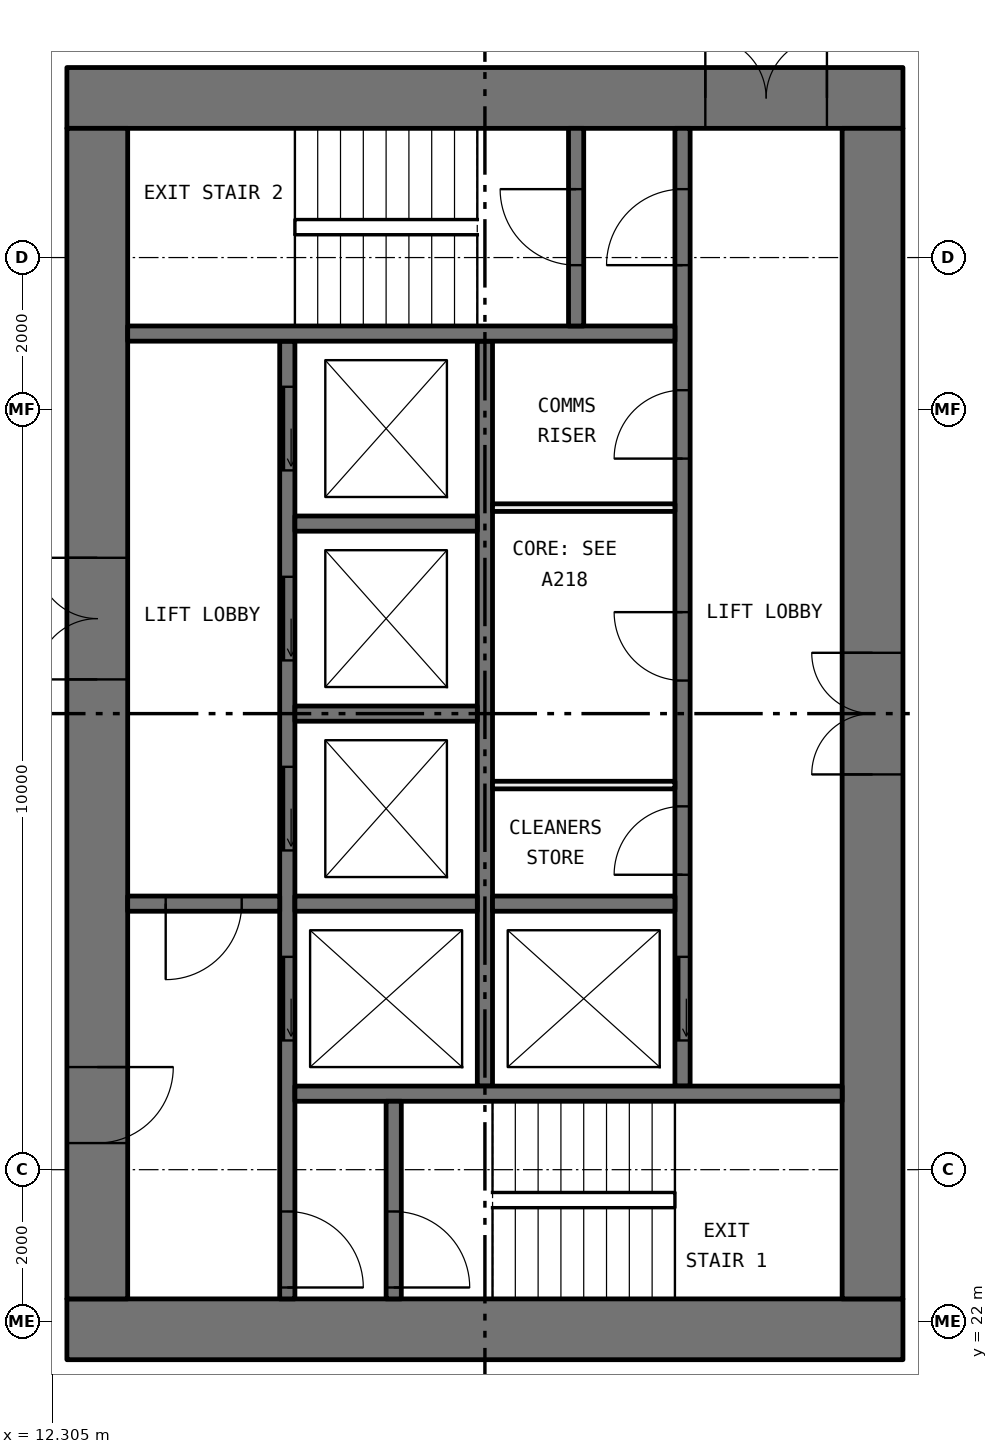
"""IFC4 building model, lengths in metres.
Left out: names, types, materials, properties, quantities, classifications, styles, units other than length and angle.
Written with IfcOpenShell. Run it as: python <this file> out.ifc"""

import sys

from ifc_helpers import new_model, si_unit, direction, frame, frame_2d, origin, place, context, subcontext, project, spatial, rectangle, extrude, element, fill, save


model = new_model("IFC4")
c1 = context("Model", 3, precision=1e-05, world=origin(), true_north=direction((0.0, 1.0)))
c2 = subcontext(c1, "Body", "Model", "MODEL_VIEW")
j1 = project(units=[si_unit("LENGTHUNIT", "METRE"), si_unit("PLANEANGLEUNIT", "RADIAN")], contexts=[c1])
p1 = place(None, origin())
s1 = spatial("IfcSite", under=j1, at=p1, CompositionType="ELEMENT")
p2 = place(p1, origin())
s2 = spatial("IfcBuilding", under=s1, at=p2, CompositionType="ELEMENT")
p3 = place(p2, frame((0.0, 0.0, 71.4)))
s3 = spatial("IfcBuildingStorey", under=s2, at=p3, CompositionType="ELEMENT", Elevation=71.4)
p4 = place(p3, frame((12.5, 21.9, 0.0), z_axis=(0.0, 0.0, 1.0), x_axis=(1.0, 0.0, 0.0)))
e1 = element("IfcWall", 1, at=p4, inside=s3, PredefinedType="SHEAR", context=c2, shape_type="SweptSolid", body=[
    extrude(rectangle(XDim=11.0, YDim=0.8, at=frame_2d((5.5, 0.0))), origin(), (0.0, 0.0, 1.0), 3.05),
])
p5 = place(p3, frame((12.5, 38.1, 0.0), z_axis=(0.0, 0.0, 1.0), x_axis=(1.0, 0.0, 0.0)))
e2 = element("IfcWall", 2, at=p5, inside=s3, PredefinedType="SHEAR", context=c2, shape_type="SweptSolid", body=[
    extrude(rectangle(XDim=11.0, YDim=0.8, at=frame_2d((5.5, 0.0))), origin(), (0.0, 0.0, 1.0), 3.05),
])
p6 = place(p5, frame((8.4, 0.0, 0.0)))
e3 = element("IfcOpeningElement", 3, at=p6, cuts=e2, PredefinedType="OPENING", context=c2, shape_type="SweptSolid", body=[
    extrude(rectangle(XDim=1.6, YDim=2.1, at=frame_2d((0.8, 1.05))), frame((0.0, 0.41, 0.0), z_axis=(0.0, -1.0, 0.0), x_axis=(1.0, 0.0, 0.0)), (0.0, 0.0, 1.0), 0.82),
])
p7 = place(p3, frame((12.9, 22.3, 0.0), z_axis=(0.0, 0.0, 1.0), x_axis=(0.0, 1.0, 0.0)))
e4 = element("IfcWall", 4, at=p7, inside=s3, PredefinedType="SHEAR", context=c2, shape_type="SweptSolid", body=[
    extrude(rectangle(XDim=15.4, YDim=0.8, at=frame_2d((7.7, 0.0))), origin(), (0.0, 0.0, 1.0), 3.05),
])
p8 = place(p7, frame((8.15, 0.0, 0.0)))
e5 = element("IfcOpeningElement", 5, at=p8, cuts=e4, PredefinedType="OPENING", context=c2, shape_type="SweptSolid", body=[
    extrude(rectangle(XDim=1.6, YDim=2.1, at=frame_2d((0.8, 1.05))), frame((0.0, 0.41, 0.0), z_axis=(0.0, -1.0, 0.0), x_axis=(1.0, 0.0, 0.0)), (0.0, 0.0, 1.0), 0.82),
])
p9 = place(p7, frame((2.05, 0.0, 0.0)))
e6 = element("IfcOpeningElement", 6, at=p9, cuts=e4, PredefinedType="OPENING", context=c2, shape_type="SweptSolid", body=[
    extrude(rectangle(XDim=1.0, YDim=2.1, at=frame_2d((0.5, 1.05))), frame((0.0, 0.41, 0.0), z_axis=(0.0, -1.0, 0.0), x_axis=(1.0, 0.0, 0.0)), (0.0, 0.0, 1.0), 0.82),
])
p10 = place(p3, frame((23.1, 22.3, 0.0), z_axis=(0.0, 0.0, 1.0), x_axis=(0.0, 1.0, 0.0)))
e7 = element("IfcWall", 7, at=p10, inside=s3, PredefinedType="SHEAR", context=c2, shape_type="SweptSolid", body=[
    extrude(rectangle(XDim=15.4, YDim=0.8, at=frame_2d((7.7, 0.0))), origin(), (0.0, 0.0, 1.0), 3.05),
])
p11 = place(p10, frame((6.9, 0.0, 0.0)))
e8 = element("IfcOpeningElement", 8, at=p11, cuts=e7, PredefinedType="OPENING", context=c2, shape_type="SweptSolid", body=[
    extrude(rectangle(XDim=1.6, YDim=2.1, at=frame_2d((0.8, 1.05))), frame((0.0, 0.41, 0.0), z_axis=(0.0, -1.0, 0.0), x_axis=(1.0, 0.0, 0.0)), (0.0, 0.0, 1.0), 0.82),
])
p12 = place(p3, frame((15.4, 22.3, 0.0), z_axis=(0.0, 0.0, 1.0), x_axis=(0.0, 1.0, 0.0)))
e9 = element("IfcWall", 9, at=p12, inside=s3, PredefinedType="SOLIDWALL", context=c2, shape_type="SweptSolid", body=[
    extrude(rectangle(XDim=12.6, YDim=0.2, at=frame_2d((6.3, 0.0))), origin(), (0.0, 0.0, 1.0), 3.05),
])
p13 = place(p12, frame((3.4, 0.0, 0.0)))
e10 = element("IfcOpeningElement", 10, at=p13, cuts=e9, PredefinedType="OPENING", context=c2, shape_type="SweptSolid", body=[
    extrude(rectangle(XDim=1.1, YDim=2.1, at=frame_2d((0.55, 1.05))), frame((0.0, 0.11, 0.0), z_axis=(0.0, -1.0, 0.0), x_axis=(1.0, 0.0, 0.0)), (0.0, 0.0, 1.0), 0.22),
])
p14 = place(p12, frame((5.9, 0.0, 0.0)))
e11 = element("IfcOpeningElement", 11, at=p14, cuts=e9, PredefinedType="OPENING", context=c2, shape_type="SweptSolid", body=[
    extrude(rectangle(XDim=1.1, YDim=2.1, at=frame_2d((0.55, 1.05))), frame((0.0, 0.11, 0.0), z_axis=(0.0, -1.0, 0.0), x_axis=(1.0, 0.0, 0.0)), (0.0, 0.0, 1.0), 0.22),
])
p15 = place(p12, frame((8.4, 0.0, 0.0)))
e12 = element("IfcOpeningElement", 12, at=p15, cuts=e9, PredefinedType="OPENING", context=c2, shape_type="SweptSolid", body=[
    extrude(rectangle(XDim=1.1, YDim=2.1, at=frame_2d((0.55, 1.05))), frame((0.0, 0.11, 0.0), z_axis=(0.0, -1.0, 0.0), x_axis=(1.0, 0.0, 0.0)), (0.0, 0.0, 1.0), 0.22),
])
p16 = place(p12, frame((10.9, 0.0, 0.0)))
e13 = element("IfcOpeningElement", 13, at=p16, cuts=e9, PredefinedType="OPENING", context=c2, shape_type="SweptSolid", body=[
    extrude(rectangle(XDim=1.1, YDim=2.1, at=frame_2d((0.55, 1.05))), frame((0.0, 0.11, 0.0), z_axis=(0.0, -1.0, 0.0), x_axis=(1.0, 0.0, 0.0)), (0.0, 0.0, 1.0), 0.22),
])
p17 = place(p12, frame((0.15, 0.0, 0.0)))
e14 = element("IfcOpeningElement", 14, at=p17, cuts=e9, PredefinedType="OPENING", context=c2, shape_type="SweptSolid", body=[
    extrude(rectangle(XDim=1.0, YDim=2.1, at=frame_2d((0.5, 1.05))), frame((0.0, 0.11, 0.0), z_axis=(0.0, -1.0, 0.0), x_axis=(1.0, 0.0, 0.0)), (0.0, 0.0, 1.0), 0.22),
])
p18 = place(p3, frame((20.6, 25.1, 0.0), z_axis=(0.0, 0.0, 1.0), x_axis=(0.0, 1.0, 0.0)))
e15 = element("IfcWall", 15, at=p18, inside=s3, PredefinedType="SOLIDWALL", context=c2, shape_type="SweptSolid", body=[
    extrude(rectangle(XDim=12.6, YDim=0.2, at=frame_2d((6.3, 0.0))), origin(), (0.0, 0.0, 1.0), 3.05),
])
p19 = place(p18, frame((0.6, 0.0, 0.0)))
e16 = element("IfcOpeningElement", 16, at=p19, cuts=e15, PredefinedType="OPENING", context=c2, shape_type="SweptSolid", body=[
    extrude(rectangle(XDim=1.1, YDim=2.1, at=frame_2d((0.55, 1.05))), frame((0.0, 0.11, 0.0), z_axis=(0.0, -1.0, 0.0), x_axis=(1.0, 0.0, 0.0)), (0.0, 0.0, 1.0), 0.22),
])
p20 = place(p18, frame((10.8, 0.0, 0.0)))
e17 = element("IfcOpeningElement", 17, at=p20, cuts=e15, PredefinedType="OPENING", context=c2, shape_type="SweptSolid", body=[
    extrude(rectangle(XDim=1.0, YDim=2.1, at=frame_2d((0.5, 1.05))), frame((0.0, 0.11, 0.0), z_axis=(0.0, -1.0, 0.0), x_axis=(1.0, 0.0, 0.0)), (0.0, 0.0, 1.0), 0.22),
])
p21 = place(p18, frame((2.78, 0.0, 0.0)))
e18 = element("IfcOpeningElement", 18, at=p21, cuts=e15, PredefinedType="OPENING", context=c2, shape_type="SweptSolid", body=[
    extrude(rectangle(XDim=0.9, YDim=2.1, at=frame_2d((0.45, 1.05))), frame((0.0, 0.11, 0.0), z_axis=(0.0, -1.0, 0.0), x_axis=(1.0, 0.0, 0.0)), (0.0, 0.0, 1.0), 0.22),
])
p22 = place(p18, frame((5.335, 0.0, 0.0)))
e19 = element("IfcOpeningElement", 19, at=p22, cuts=e15, PredefinedType="OPENING", context=c2, shape_type="SweptSolid", body=[
    extrude(rectangle(XDim=0.9, YDim=2.1, at=frame_2d((0.45, 1.05))), frame((0.0, 0.11, 0.0), z_axis=(0.0, -1.0, 0.0), x_axis=(1.0, 0.0, 0.0)), (0.0, 0.0, 1.0), 0.22),
])
p23 = place(p18, frame((8.255, 0.0, 0.0)))
e20 = element("IfcOpeningElement", 20, at=p23, cuts=e15, PredefinedType="OPENING", context=c2, shape_type="SweptSolid", body=[
    extrude(rectangle(XDim=0.9, YDim=2.1, at=frame_2d((0.45, 1.05))), frame((0.0, 0.11, 0.0), z_axis=(0.0, -1.0, 0.0), x_axis=(1.0, 0.0, 0.0)), (0.0, 0.0, 1.0), 0.22),
])
p24 = place(p3, frame((18.0, 25.1, 0.0), z_axis=(0.0, 0.0, 1.0), x_axis=(0.0, 1.0, 0.0)))
e21 = element("IfcWall", 21, at=p24, inside=s3, PredefinedType="SOLIDWALL", context=c2, shape_type="SweptSolid", body=[
    extrude(rectangle(XDim=9.8, YDim=0.2, at=frame_2d((4.9, 0.0))), origin(), (0.0, 0.0, 1.0), 3.05),
])
for number, where, z_axis, x_axis in (
    (22, (15.5, 25.0, 0.0), (0.0, 0.0, 1.0), (1.0, 0.0, 0.0)),
    (23, (13.3, 35.0, 0.0), (0.0, 0.0, 1.0), (1.0, 0.0, 0.0)),
):
    element("IfcWall", number, at=place(p3, frame(where, z_axis=z_axis, x_axis=x_axis)), inside=s3, PredefinedType="SOLIDWALL", context=c2, shape_type="SweptSolid", body=[
        extrude(rectangle(XDim=7.2, YDim=0.2, at=frame_2d((3.6, 0.0))), origin(), (0.0, 0.0, 1.0), 3.05),
    ])
p25 = place(p3, frame((13.3, 27.5, 0.0), z_axis=(0.0, 0.0, 1.0), x_axis=(1.0, 0.0, 0.0)))
e24 = element("IfcWall", 24, at=p25, inside=s3, PredefinedType="SOLIDWALL", context=c2, shape_type="SweptSolid", body=[
    extrude(rectangle(XDim=2.0, YDim=0.2, at=frame_2d((1.0, 0.0))), origin(), (0.0, 0.0, 1.0), 3.05),
])
p26 = place(p25, frame((0.5, 0.0, 0.0)))
e25 = element("IfcOpeningElement", 25, at=p26, cuts=e24, PredefinedType="OPENING", context=c2, shape_type="SweptSolid", body=[
    extrude(rectangle(XDim=1.0, YDim=2.1, at=frame_2d((0.5, 1.05))), frame((0.0, 0.11, 0.0), z_axis=(0.0, -1.0, 0.0), x_axis=(1.0, 0.0, 0.0)), (0.0, 0.0, 1.0), 0.22),
])
p27 = place(p3, frame((16.8, 22.3, 0.0), z_axis=(0.0, 0.0, 1.0), x_axis=(0.0, 1.0, 0.0)))
e26 = element("IfcWall", 26, at=p27, inside=s3, PredefinedType="SOLIDWALL", context=c2, shape_type="SweptSolid", body=[
    extrude(rectangle(XDim=2.6, YDim=0.2, at=frame_2d((1.3, 0.0))), origin(), (0.0, 0.0, 1.0), 3.05),
])
p28 = place(p27, frame((0.15, 0.0, 0.0)))
e27 = element("IfcOpeningElement", 27, at=p28, cuts=e26, PredefinedType="OPENING", context=c2, shape_type="SweptSolid", body=[
    extrude(rectangle(XDim=1.0, YDim=2.1, at=frame_2d((0.5, 1.05))), frame((0.0, 0.11, 0.0), z_axis=(0.0, -1.0, 0.0), x_axis=(1.0, 0.0, 0.0)), (0.0, 0.0, 1.0), 0.22),
])
p29 = place(p3, frame((19.2, 35.1, 0.0), z_axis=(0.0, 0.0, 1.0), x_axis=(0.0, 1.0, 0.0)))
e28 = element("IfcWall", 28, at=p29, inside=s3, PredefinedType="SOLIDWALL", context=c2, shape_type="SweptSolid", body=[
    extrude(rectangle(XDim=2.6, YDim=0.2, at=frame_2d((1.3, 0.0))), origin(), (0.0, 0.0, 1.0), 3.05),
])
p30 = place(p29, frame((0.8, 0.0, 0.0)))
e29 = element("IfcOpeningElement", 29, at=p30, cuts=e28, PredefinedType="OPENING", context=c2, shape_type="SweptSolid", body=[
    extrude(rectangle(XDim=1.0, YDim=2.1, at=frame_2d((0.5, 1.05))), frame((0.0, 0.11, 0.0), z_axis=(0.0, -1.0, 0.0), x_axis=(1.0, 0.0, 0.0)), (0.0, 0.0, 1.0), 0.22),
])
for number, where, z_axis, x_axis in (
    (30, (15.5, 27.5, 0.0), (0.0, 0.0, 1.0), (1.0, 0.0, 0.0)),
    (31, (15.5, 30.0, 0.0), (0.0, 0.0, 1.0), (1.0, 0.0, 0.0)),
    (32, (15.5, 32.5, 0.0), (0.0, 0.0, 1.0), (1.0, 0.0, 0.0)),
    (33, (18.1, 27.5, 0.0), (0.0, 0.0, 1.0), (1.0, 0.0, 0.0)),
):
    element("IfcWall", number, at=place(p3, frame(where, z_axis=z_axis, x_axis=x_axis)), inside=s3, PredefinedType="SOLIDWALL", context=c2, shape_type="SweptSolid", body=[
        extrude(rectangle(XDim=2.4, YDim=0.2, at=frame_2d((1.2, 0.0))), origin(), (0.0, 0.0, 1.0), 3.05),
    ])
for number, where, z_axis, x_axis in (
    (34, (18.1, 29.06, 0.0), (0.0, 0.0, 1.0), (1.0, 0.0, 0.0)),
    (35, (18.1, 32.71, 0.0), (0.0, 0.0, 1.0), (1.0, 0.0, 0.0)),
):
    element("IfcWall", number, at=place(p3, frame(where, z_axis=z_axis, x_axis=x_axis)), inside=s3, PredefinedType="PARTITIONING", context=c2, shape_type="SweptSolid", body=[
        extrude(rectangle(XDim=2.4, YDim=0.1, at=frame_2d((1.2, 0.0))), origin(), (0.0, 0.0, 1.0), 3.05),
    ])
p31 = place(p19, origin())
e36 = element("IfcDoor", 36, at=p31, inside=s3, OperationType="SLIDING_TO_LEFT", PredefinedType="DOOR", context=c2, shape_type="SweptSolid", body=[
    extrude(rectangle(XDim=1.1, YDim=2.1, at=frame_2d((0.55, 1.05))), frame((0.0, 0.025, 0.0), z_axis=(0.0, -1.0, 0.0), x_axis=(1.0, 0.0, 0.0)), (0.0, 0.0, 1.0), 0.05),
])
fill(e16, e36)
p32 = place(p13, origin())
e37 = element("IfcDoor", 37, at=p32, inside=s3, OperationType="SLIDING_TO_LEFT", PredefinedType="DOOR", context=c2, shape_type="SweptSolid", body=[
    extrude(rectangle(XDim=1.1, YDim=2.1, at=frame_2d((0.55, 1.05))), frame((0.0, 0.025, 0.0), z_axis=(0.0, -1.0, 0.0), x_axis=(1.0, 0.0, 0.0)), (0.0, 0.0, 1.0), 0.05),
])
fill(e10, e37)
p33 = place(p14, origin())
e38 = element("IfcDoor", 38, at=p33, inside=s3, OperationType="SLIDING_TO_LEFT", PredefinedType="DOOR", context=c2, shape_type="SweptSolid", body=[
    extrude(rectangle(XDim=1.1, YDim=2.1, at=frame_2d((0.55, 1.05))), frame((0.0, 0.025, 0.0), z_axis=(0.0, -1.0, 0.0), x_axis=(1.0, 0.0, 0.0)), (0.0, 0.0, 1.0), 0.05),
])
fill(e11, e38)
p34 = place(p15, origin())
e39 = element("IfcDoor", 39, at=p34, inside=s3, OperationType="SLIDING_TO_LEFT", PredefinedType="DOOR", context=c2, shape_type="SweptSolid", body=[
    extrude(rectangle(XDim=1.1, YDim=2.1, at=frame_2d((0.55, 1.05))), frame((0.0, 0.025, 0.0), z_axis=(0.0, -1.0, 0.0), x_axis=(1.0, 0.0, 0.0)), (0.0, 0.0, 1.0), 0.05),
])
fill(e12, e39)
p35 = place(p16, origin())
e40 = element("IfcDoor", 40, at=p35, inside=s3, OperationType="SLIDING_TO_LEFT", PredefinedType="DOOR", context=c2, shape_type="SweptSolid", body=[
    extrude(rectangle(XDim=1.1, YDim=2.1, at=frame_2d((0.55, 1.05))), frame((0.0, 0.025, 0.0), z_axis=(0.0, -1.0, 0.0), x_axis=(1.0, 0.0, 0.0)), (0.0, 0.0, 1.0), 0.05),
])
fill(e13, e40)
p36 = place(p28, frame((1.0, 0.0, 0.0), x_axis=(-1.0, 0.0, 0.0)))
e41 = element("IfcDoor", 41, at=p36, inside=s3, OperationType="SINGLE_SWING_LEFT", PredefinedType="DOOR", context=c2, shape_type="SweptSolid", body=[
    extrude(rectangle(XDim=1.0, YDim=2.1, at=frame_2d((0.5, 1.05))), frame((0.0, 0.025, 0.0), z_axis=(0.0, -1.0, 0.0), x_axis=(1.0, 0.0, 0.0)), (0.0, 0.0, 1.0), 0.05),
])
fill(e27, e41)
p37 = place(p17, frame((1.0, 0.0, 0.0), x_axis=(-1.0, 0.0, 0.0)))
e42 = element("IfcDoor", 42, at=p37, inside=s3, OperationType="SINGLE_SWING_LEFT", PredefinedType="DOOR", context=c2, shape_type="SweptSolid", body=[
    extrude(rectangle(XDim=1.0, YDim=2.1, at=frame_2d((0.5, 1.05))), frame((0.0, 0.025, 0.0), z_axis=(0.0, -1.0, 0.0), x_axis=(1.0, 0.0, 0.0)), (0.0, 0.0, 1.0), 0.05),
])
fill(e14, e42)
p38 = place(p20, origin())
e43 = element("IfcDoor", 43, at=p38, inside=s3, OperationType="SINGLE_SWING_RIGHT", PredefinedType="DOOR", context=c2, shape_type="SweptSolid", body=[
    extrude(rectangle(XDim=1.0, YDim=2.1, at=frame_2d((0.5, 1.05))), frame((0.0, 0.025, 0.0), z_axis=(0.0, -1.0, 0.0), x_axis=(1.0, 0.0, 0.0)), (0.0, 0.0, 1.0), 0.05),
])
fill(e17, e43)
p39 = place(p30, origin())
e44 = element("IfcDoor", 44, at=p39, inside=s3, OperationType="SINGLE_SWING_LEFT", PredefinedType="DOOR", context=c2, shape_type="SweptSolid", body=[
    extrude(rectangle(XDim=1.0, YDim=2.1, at=frame_2d((0.5, 1.05))), frame((0.0, 0.025, 0.0), z_axis=(0.0, -1.0, 0.0), x_axis=(1.0, 0.0, 0.0)), (0.0, 0.0, 1.0), 0.05),
])
fill(e29, e44)
p40 = place(p26, frame((1.0, 0.0, 0.0), x_axis=(-1.0, 0.0, 0.0)))
e45 = element("IfcDoor", 45, at=p40, inside=s3, OperationType="SINGLE_SWING_LEFT", PredefinedType="DOOR", context=c2, shape_type="SweptSolid", body=[
    extrude(rectangle(XDim=1.0, YDim=2.1, at=frame_2d((0.5, 1.05))), frame((0.0, 0.025, 0.0), z_axis=(0.0, -1.0, 0.0), x_axis=(1.0, 0.0, 0.0)), (0.0, 0.0, 1.0), 0.05),
])
fill(e25, e45)
p41 = place(p8, origin())
e46 = element("IfcDoor", 46, at=p41, inside=s3, OperationType="DOUBLE_DOOR_SINGLE_SWING", PredefinedType="DOOR", context=c2, shape_type="SweptSolid", body=[
    extrude(rectangle(XDim=1.6, YDim=2.1, at=frame_2d((0.8, 1.05))), frame((0.0, 0.025, 0.0), z_axis=(0.0, -1.0, 0.0), x_axis=(1.0, 0.0, 0.0)), (0.0, 0.0, 1.0), 0.05),
])
fill(e5, e46)
p42 = place(p9, frame((1.0, 0.0, 0.0), x_axis=(-1.0, 0.0, 0.0)))
e47 = element("IfcDoor", 47, at=p42, inside=s3, OperationType="SINGLE_SWING_RIGHT", PredefinedType="DOOR", context=c2, shape_type="SweptSolid", body=[
    extrude(rectangle(XDim=1.0, YDim=2.1, at=frame_2d((0.5, 1.05))), frame((0.0, 0.025, 0.0), z_axis=(0.0, -1.0, 0.0), x_axis=(1.0, 0.0, 0.0)), (0.0, 0.0, 1.0), 0.05),
])
fill(e6, e47)
p43 = place(p6, origin())
e48 = element("IfcDoor", 48, at=p43, inside=s3, OperationType="DOUBLE_DOOR_SINGLE_SWING", PredefinedType="DOOR", context=c2, shape_type="SweptSolid", body=[
    extrude(rectangle(XDim=1.6, YDim=2.1, at=frame_2d((0.8, 1.05))), frame((0.0, 0.025, 0.0), z_axis=(0.0, -1.0, 0.0), x_axis=(1.0, 0.0, 0.0)), (0.0, 0.0, 1.0), 0.05),
])
fill(e3, e48)
p44 = place(p11, origin())
e49 = element("IfcDoor", 49, at=p44, inside=s3, OperationType="DOUBLE_DOOR_SINGLE_SWING", PredefinedType="DOOR", context=c2, shape_type="SweptSolid", body=[
    extrude(rectangle(XDim=1.6, YDim=2.1, at=frame_2d((0.8, 1.05))), frame((0.0, 0.025, 0.0), z_axis=(0.0, -1.0, 0.0), x_axis=(1.0, 0.0, 0.0)), (0.0, 0.0, 1.0), 0.05),
])
fill(e8, e49)
p45 = place(p21, origin())
e50 = element("IfcDoor", 50, at=p45, inside=s3, OperationType="SINGLE_SWING_RIGHT", PredefinedType="DOOR", context=c2, shape_type="SweptSolid", body=[
    extrude(rectangle(XDim=0.9, YDim=2.1, at=frame_2d((0.45, 1.05))), frame((0.0, 0.025, 0.0), z_axis=(0.0, -1.0, 0.0), x_axis=(1.0, 0.0, 0.0)), (0.0, 0.0, 1.0), 0.05),
])
fill(e18, e50)
p46 = place(p22, origin())
e51 = element("IfcDoor", 51, at=p46, inside=s3, OperationType="SINGLE_SWING_LEFT", PredefinedType="DOOR", context=c2, shape_type="SweptSolid", body=[
    extrude(rectangle(XDim=0.9, YDim=2.1, at=frame_2d((0.45, 1.05))), frame((0.0, 0.025, 0.0), z_axis=(0.0, -1.0, 0.0), x_axis=(1.0, 0.0, 0.0)), (0.0, 0.0, 1.0), 0.05),
])
fill(e19, e51)
p47 = place(p23, origin())
e52 = element("IfcDoor", 52, at=p47, inside=s3, OperationType="SINGLE_SWING_RIGHT", PredefinedType="DOOR", context=c2, shape_type="SweptSolid", body=[
    extrude(rectangle(XDim=0.9, YDim=2.1, at=frame_2d((0.45, 1.05))), frame((0.0, 0.025, 0.0), z_axis=(0.0, -1.0, 0.0), x_axis=(1.0, 0.0, 0.0)), (0.0, 0.0, 1.0), 0.05),
])
fill(e20, e52)
save(model, sys.argv[1])
